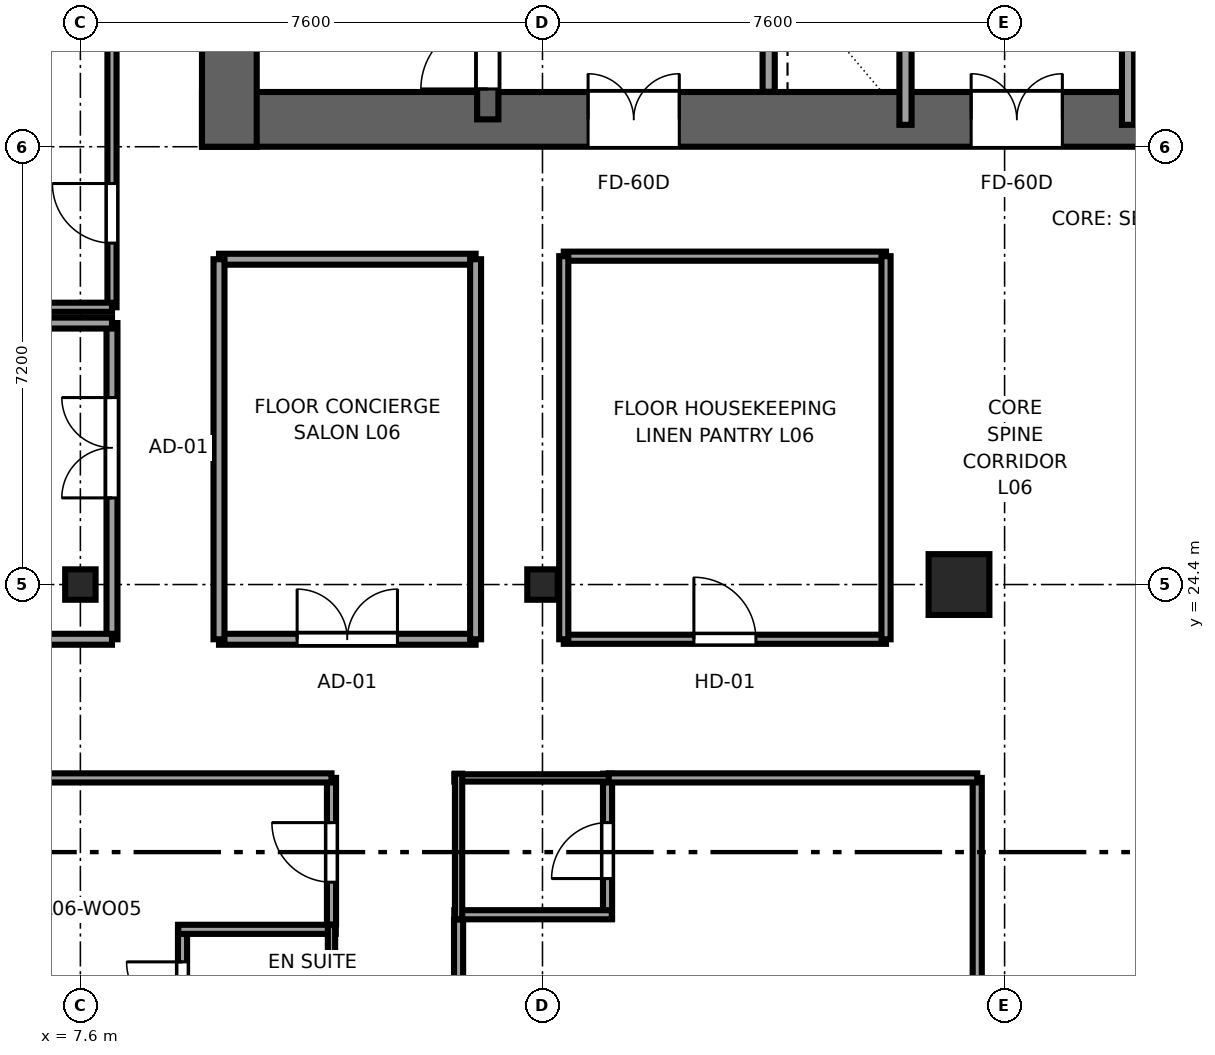
"""IFC4 building model, lengths in metres.
Left out: names, types, materials, properties, quantities, classifications, styles, units other than length and angle.
Written with IfcOpenShell. Run it as: python <this file> out.ifc"""

import sys

from ifc_helpers import new_model, si_unit, direction, frame, frame_2d, origin, origin_2d, place, context, subcontext, project, spatial, rectangle, i_section, extrude, source, transform, mapped, element, fill, save


model = new_model("IFC4")
c1 = context("Model", 3, precision=1e-05, world=origin(), true_north=direction((0.0, 1.0)))
c2 = subcontext(c1, "Body", "Model", "MODEL_VIEW")
j1 = project(units=[si_unit("LENGTHUNIT", "METRE"), si_unit("PLANEANGLEUNIT", "RADIAN")], contexts=[c1])
p1 = place(None, origin())
s1 = spatial("IfcSite", under=j1, at=p1, CompositionType="ELEMENT")
p2 = place(p1, origin())
s2 = spatial("IfcBuilding", under=s1, at=p2, CompositionType="ELEMENT")
p3 = place(p2, frame((0.0, 0.0, 32.0)))
s3 = spatial("IfcBuildingStorey", under=s2, at=p3, CompositionType="ELEMENT", Elevation=32.0)
p4 = place(p3, frame((9.6, 32.05, 0.0), z_axis=(0.0, 0.0, 1.0), x_axis=(1.0, 0.0, 0.0)))
e1 = element("IfcWall", 1, at=p4, inside=s3, PredefinedType="SHEAR", context=c2, shape_type="SweptSolid", body=[
    extrude(rectangle(XDim=26.8, YDim=0.9, at=frame_2d((13.4, 0.0))), origin(), (0.0, 0.0, 1.0), 3.55),
])
p5 = place(p4, frame((7.85, 0.0, 0.0), z_axis=(0.0, 0.0, 1.0), x_axis=(-1.0, 0.0, 0.0)))
e2 = element("IfcOpeningElement", 2, at=p5, cuts=e1, PredefinedType="OPENING", context=c2, shape_type="SweptSolid", body=[
    extrude(rectangle(XDim=1.5, YDim=2.04, at=frame_2d((0.75, 1.02))), frame((0.0, 0.46, 0.0), z_axis=(0.0, -1.0, 0.0), x_axis=(1.0, 0.0, 0.0)), (0.0, 0.0, 1.0), 0.92),
])
p6 = place(p4, frame((14.15, 0.0, 0.0), z_axis=(0.0, 0.0, 1.0), x_axis=(-1.0, 0.0, 0.0)))
e3 = element("IfcOpeningElement", 3, at=p6, cuts=e1, PredefinedType="OPENING", context=c2, shape_type="SweptSolid", body=[
    extrude(rectangle(XDim=1.5, YDim=2.04, at=frame_2d((0.75, 1.02))), frame((0.0, 0.46, 0.0), z_axis=(0.0, -1.0, 0.0), x_axis=(1.0, 0.0, 0.0)), (0.0, 0.0, 1.0), 0.92),
])
p7 = place(p4, frame((20.45, 0.0, 0.0), z_axis=(0.0, 0.0, 1.0), x_axis=(-1.0, 0.0, 0.0)))
e4 = element("IfcOpeningElement", 4, at=p7, cuts=e1, PredefinedType="OPENING", context=c2, shape_type="SweptSolid", body=[
    extrude(rectangle(XDim=1.5, YDim=2.04, at=frame_2d((0.75, 1.02))), frame((0.0, 0.46, 0.0), z_axis=(0.0, -1.0, 0.0), x_axis=(1.0, 0.0, 0.0)), (0.0, 0.0, 1.0), 0.92),
])
p8 = place(p3, frame((10.05, 31.6, 0.0), z_axis=(0.0, 0.0, 1.0), x_axis=(0.0, 1.0, 0.0)))
e5 = element("IfcWall", 5, at=p8, inside=s3, PredefinedType="SHEAR", context=c2, shape_type="SweptSolid", body=[
    extrude(rectangle(XDim=13.6, YDim=0.9, at=frame_2d((6.8, 0.0))), origin(), (0.0, 0.0, 1.0), 3.55),
])
p9 = place(p3, frame((14.3, 32.05, 0.0), z_axis=(0.0, 0.0, 1.0), x_axis=(0.0, 1.0, 0.0)))
e6 = element("IfcWall", 6, at=p9, inside=s3, PredefinedType="SHEAR", context=c2, shape_type="SweptSolid", body=[
    extrude(rectangle(XDim=12.7, YDim=0.35, at=frame_2d((6.35, 0.0))), origin(), (0.0, 0.0, 1.0), 3.55),
])
p10 = place(p9, frame((0.5, 0.0, 0.0)))
e7 = element("IfcOpeningElement", 7, at=p10, cuts=e6, PredefinedType="OPENING", context=c2, shape_type="SweptSolid", body=[
    extrude(rectangle(XDim=1.1, YDim=2.12, at=frame_2d((0.55, 1.06))), frame((0.0, 0.185, 0.0), z_axis=(0.0, -1.0, 0.0), x_axis=(1.0, 0.0, 0.0)), (0.0, 0.0, 1.0), 0.37),
])
m1 = source(origin(), c2, "Body", "SweptSolid", [
    extrude(i_section(OverallWidth=0.5, OverallDepth=0.5, WebThickness=0.028, FlangeThickness=0.045, at=origin_2d()), origin(), (0.0, 0.0, 1.0), 3.55),
])
for number, where, z_axis, x_axis in (
    (8, (7.6, 24.4, 0.0), (0.0, 0.0, 1.0), (1.0, 0.0, 0.0)),
    (9, (15.2, 24.4, 0.0), (0.0, 0.0, 1.0), (1.0, 0.0, 0.0)),
):
    element("IfcColumn", number, at=place(p3, frame(where, z_axis=z_axis, x_axis=x_axis)), inside=s3, PredefinedType="COLUMN", context=c2, shape_type="MappedRepresentation", body=[
        mapped(m1, transform((0.0, 0.0, 0.0), x_axis=(1.0, 0.0, 0.0), y_axis=(0.0, 1.0, 0.0), z_axis=(0.0, 0.0, 1.0), scale=1.0)),
    ])
m2 = source(origin(), c2, "Body", "SweptSolid", [
    extrude(rectangle(XDim=1.0, YDim=1.0, at=origin_2d()), origin(), (0.0, 0.0, 1.0), 3.55),
])
p11 = place(p3, frame((22.05, 24.4, 0.0), z_axis=(0.0, 0.0, 1.0), x_axis=(1.0, 0.0, 0.0)))
e10 = element("IfcColumn", 10, at=p11, inside=s3, PredefinedType="COLUMN", context=c2, shape_type="MappedRepresentation", body=[
    mapped(m2, transform((0.0, 0.0, 0.0), x_axis=(1.0, 0.0, 0.0), y_axis=(0.0, 1.0, 0.0), z_axis=(0.0, 0.0, 1.0), scale=1.0)),
])
p12 = place(p3, frame((18.92, 32.504, 0.0), z_axis=(0.0, 0.0, 1.0), x_axis=(0.0, 1.0, 0.0)))
e11 = element("IfcWall", 11, at=p12, inside=s3, PredefinedType="SOLIDWALL", context=c2, shape_type="SweptSolid", body=[
    extrude(rectangle(XDim=3.646, YDim=0.2, at=frame_2d((1.823, 0.0))), origin(), (0.0, 0.0, 1.0), 3.37),
])
for number, where, z_axis, x_axis in (
    (12, (21.17, 31.96, 0.0), (0.0, 0.0, 1.0), (0.0, 1.0, 0.0)),
    (13, (24.83, 31.96, 0.0), (0.0, 0.0, 1.0), (0.0, 1.0, 0.0)),
):
    element("IfcWall", number, at=place(p3, frame(where, z_axis=z_axis, x_axis=x_axis)), inside=s3, PredefinedType="SOLIDWALL", context=c2, shape_type="SweptSolid", body=[
        extrude(rectangle(XDim=12.58, YDim=0.2, at=frame_2d((6.29, 0.0))), origin(), (0.0, 0.0, 1.0), 3.37),
    ])
p13 = place(p3, frame((9.28, 16.81, 0.0), z_axis=(0.0, 0.0, 1.0), x_axis=(0.0, 1.0, 0.0)))
e14 = element("IfcWall", 14, at=p13, inside=s3, PredefinedType="PARTITIONING", context=c2, shape_type="SweptSolid", body=[
    extrude(rectangle(XDim=1.99, YDim=0.15, at=frame_2d((0.995, 0.0))), origin(), (0.0, 0.0, 1.0), 3.37),
])
p14 = place(p13, frame((0.465, 0.0, 0.0)))
e15 = element("IfcOpeningElement", 15, at=p14, cuts=e14, PredefinedType="OPENING", context=c2, shape_type="SweptSolid", body=[
    extrude(rectangle(XDim=0.92, YDim=2.01, at=frame_2d((0.46, 1.005))), frame((0.0, 0.085, 0.0), z_axis=(0.0, -1.0, 0.0), x_axis=(1.0, 0.0, 0.0)), (0.0, 0.0, 1.0), 0.17),
])
p15 = place(p3, frame((9.21, 18.73, 0.0), z_axis=(0.0, 0.0, 1.0), x_axis=(1.0, 0.0, 0.0)))
e16 = element("IfcWall", 16, at=p15, inside=s3, PredefinedType="PARTITIONING", context=c2, shape_type="SweptSolid", body=[
    extrude(rectangle(XDim=2.59, YDim=0.15, at=frame_2d((1.295, 0.0))), origin(), (0.0, 0.0, 1.0), 3.37),
])
p16 = place(p3, frame((11.73, 16.81, 0.0), z_axis=(0.0, 0.0, 1.0), x_axis=(0.0, 1.0, 0.0)))
e17 = element("IfcWall", 17, at=p16, inside=s3, PredefinedType="PLUMBINGWALL", context=c2, shape_type="SweptSolid", body=[
    extrude(rectangle(XDim=1.99, YDim=0.12, at=frame_2d((0.995, 0.0))), origin(), (0.0, 0.0, 1.0), 3.37),
])
p17 = place(p3, frame((16.27, 18.9, 0.0), z_axis=(0.0, 0.0, 1.0), x_axis=(0.0, 1.0, 0.0)))
e18 = element("IfcWall", 18, at=p17, inside=s3, PredefinedType="PARTITIONING", context=c2, shape_type="SweptSolid", body=[
    extrude(rectangle(XDim=2.39, YDim=0.15, at=frame_2d((1.195, 0.0))), origin(), (0.0, 0.0, 1.0), 3.37),
])
p18 = place(p17, frame((0.665, 0.0, 0.0)))
e19 = element("IfcOpeningElement", 19, at=p18, cuts=e18, PredefinedType="OPENING", context=c2, shape_type="SweptSolid", body=[
    extrude(rectangle(XDim=0.92, YDim=2.01, at=frame_2d((0.46, 1.005))), frame((0.0, 0.085, 0.0), z_axis=(0.0, -1.0, 0.0), x_axis=(1.0, 0.0, 0.0)), (0.0, 0.0, 1.0), 0.17),
])
p19 = place(p3, frame((13.75, 18.97, 0.0), z_axis=(0.0, 0.0, 1.0), x_axis=(1.0, 0.0, 0.0)))
e20 = element("IfcWall", 20, at=p19, inside=s3, PredefinedType="PARTITIONING", context=c2, shape_type="SweptSolid", body=[
    extrude(rectangle(XDim=2.59, YDim=0.15, at=frame_2d((1.295, 0.0))), origin(), (0.0, 0.0, 1.0), 3.37),
])
p20 = place(p3, frame((13.75, 21.22, 0.0), z_axis=(0.0, 0.0, 1.0), x_axis=(1.0, 0.0, 0.0)))
e21 = element("IfcWall", 21, at=p20, inside=s3, PredefinedType="PLUMBINGWALL", context=c2, shape_type="SweptSolid", body=[
    extrude(rectangle(XDim=2.59, YDim=0.12, at=frame_2d((1.295, 0.0))), origin(), (0.0, 0.0, 1.0), 3.37),
])
p21 = place(p3, frame((13.82, 18.9, 0.0), z_axis=(0.0, 0.0, 1.0), x_axis=(0.0, 1.0, 0.0)))
e22 = element("IfcWall", 22, at=p21, inside=s3, PredefinedType="PLUMBINGWALL", context=c2, shape_type="SweptSolid", body=[
    extrude(rectangle(XDim=2.39, YDim=0.12, at=frame_2d((1.195, 0.0))), origin(), (0.0, 0.0, 1.0), 3.37),
])
p22 = place(p3, frame((11.73, 18.81, 0.0), z_axis=(0.0, 0.0, 1.0), x_axis=(0.0, 1.0, 0.0)))
e23 = element("IfcWall", 23, at=p22, inside=s3, PredefinedType="PARTITIONING", context=c2, shape_type="SweptSolid", body=[
    extrude(rectangle(XDim=2.41, YDim=0.15, at=frame_2d((1.205, 0.0))), origin(), (0.0, 0.0, 1.0), 3.37),
])
p23 = place(p22, frame((0.695, 0.0, 0.0)))
e24 = element("IfcOpeningElement", 24, at=p23, cuts=e23, PredefinedType="OPENING", context=c2, shape_type="SweptSolid", body=[
    extrude(rectangle(XDim=0.98, YDim=2.12, at=frame_2d((0.49, 1.06))), frame((0.0, 0.085, 0.0), z_axis=(0.0, -1.0, 0.0), x_axis=(1.0, 0.0, 0.0)), (0.0, 0.0, 1.0), 0.17),
])
p24 = place(p3, frame((0.405, 21.22, 0.0), z_axis=(0.0, 0.0, 1.0), x_axis=(1.0, 0.0, 0.0)))
e25 = element("IfcWall", 25, at=p24, inside=s3, PredefinedType="PARTITIONING", context=c2, shape_type="SweptSolid", body=[
    extrude(rectangle(XDim=11.325, YDim=0.15, at=frame_2d((5.663, 0.0))), origin(), (0.0, 0.0, 1.0), 3.37),
])
p25 = place(p3, frame((13.82, 14.48, 0.0), z_axis=(0.0, 0.0, 1.0), x_axis=(0.0, 1.0, 0.0)))
e26 = element("IfcWall", 26, at=p25, inside=s3, PredefinedType="PARTITIONING", context=c2, shape_type="SweptSolid", body=[
    extrude(rectangle(XDim=4.41, YDim=0.15, at=frame_2d((2.205, 0.0))), origin(), (0.0, 0.0, 1.0), 3.37),
])
p26 = place(p25, frame((1.995, 0.0, 0.0)))
e27 = element("IfcOpeningElement", 27, at=p26, cuts=e26, PredefinedType="OPENING", context=c2, shape_type="SweptSolid", body=[
    extrude(rectangle(XDim=0.98, YDim=2.12, at=frame_2d((0.49, 1.06))), frame((0.0, 0.085, 0.0), z_axis=(0.0, -1.0, 0.0), x_axis=(1.0, 0.0, 0.0)), (0.0, 0.0, 1.0), 0.17),
])
p27 = place(p3, frame((22.35, 14.48, 0.0), z_axis=(0.0, 0.0, 1.0), x_axis=(0.0, 1.0, 0.0)))
e28 = element("IfcWall", 28, at=p27, inside=s3, PredefinedType="PARTITIONING", context=c2, shape_type="SweptSolid", body=[
    extrude(rectangle(XDim=6.74, YDim=0.15, at=frame_2d((3.37, 0.0))), origin(), (0.0, 0.0, 1.0), 3.37),
])
p28 = place(p3, frame((16.29, 21.22, 0.0), z_axis=(0.0, 0.0, 1.0), x_axis=(1.0, 0.0, 0.0)))
e29 = element("IfcWall", 29, at=p28, inside=s3, PredefinedType="PARTITIONING", context=c2, shape_type="SweptSolid", body=[
    extrude(rectangle(XDim=6.06, YDim=0.15, at=frame_2d((3.03, 0.0))), origin(), (0.0, 0.0, 1.0), 3.37),
])
p29 = place(p3, frame((8.12, 23.5, 0.0), z_axis=(0.0, 0.0, 1.0), x_axis=(0.0, 1.0, 0.0)))
e30 = element("IfcWall", 30, at=p29, inside=s3, PredefinedType="PARTITIONING", context=c2, shape_type="SweptSolid", body=[
    extrude(rectangle(XDim=5.2, YDim=0.18, at=frame_2d((2.6, 0.0))), origin(), (0.0, 0.0, 1.0), 3.37),
])
p30 = place(p29, frame((2.325, 0.0, 0.0)))
e31 = element("IfcOpeningElement", 31, at=p30, cuts=e30, PredefinedType="OPENING", context=c2, shape_type="SweptSolid", body=[
    extrude(rectangle(XDim=1.65, YDim=2.15, at=frame_2d((0.825, 1.075))), frame((0.0, 0.1, 0.0), z_axis=(0.0, -1.0, 0.0), x_axis=(1.0, 0.0, 0.0)), (0.0, 0.0, 1.0), 0.2),
])
for number, where, z_axis, x_axis in (
    (32, (0.405, 23.5, 0.0), (0.0, 0.0, 1.0), (1.0, 0.0, 0.0)),
    (33, (0.405, 28.7, 0.0), (0.0, 0.0, 1.0), (1.0, 0.0, 0.0)),
):
    element("IfcWall", number, at=place(p3, frame(where, z_axis=z_axis, x_axis=x_axis)), inside=s3, PredefinedType="PARTITIONING", context=c2, shape_type="SweptSolid", body=[
        extrude(rectangle(XDim=7.715, YDim=0.18, at=frame_2d((3.857, 0.0))), origin(), (0.0, 0.0, 1.0), 3.37),
    ])
p31 = place(p3, frame((8.12, 28.96, 0.0), z_axis=(0.0, 0.0, 1.0), x_axis=(0.0, 1.0, 0.0)))
e34 = element("IfcWall", 34, at=p31, inside=s3, PredefinedType="PARTITIONING", context=c2, shape_type="SweptSolid", body=[
    extrude(rectangle(XDim=16.635, YDim=0.15, at=frame_2d((8.317, 0.0))), origin(), (0.0, 0.0, 1.0), 3.37),
])
p32 = place(p31, frame((1.055, 0.0, 0.0)))
e35 = element("IfcOpeningElement", 35, at=p32, cuts=e34, PredefinedType="OPENING", context=c2, shape_type="SweptSolid", body=[
    extrude(rectangle(XDim=0.98, YDim=2.12, at=frame_2d((0.49, 1.06))), frame((0.0, 0.085, 0.0), z_axis=(0.0, -1.0, 0.0), x_axis=(1.0, 0.0, 0.0)), (0.0, 0.0, 1.0), 0.17),
])
p33 = place(p3, frame((2.77, 28.96, 0.0), z_axis=(0.0, 0.0, 1.0), x_axis=(1.0, 0.0, 0.0)))
e36 = element("IfcWall", 36, at=p33, inside=s3, PredefinedType="PARTITIONING", context=c2, shape_type="SweptSolid", body=[
    extrude(rectangle(XDim=5.35, YDim=0.15, at=frame_2d((2.675, 0.0))), origin(), (0.0, 0.0, 1.0), 3.37),
])
p34 = place(p3, frame((9.88, 23.5, 0.0), z_axis=(0.0, 0.0, 1.0), x_axis=(1.0, 0.0, 0.0)))
e37 = element("IfcWall", 37, at=p34, inside=s3, PredefinedType="PARTITIONING", context=c2, shape_type="SweptSolid", body=[
    extrude(rectangle(XDim=4.22, YDim=0.18, at=frame_2d((2.11, 0.0))), origin(), (0.0, 0.0, 1.0), 3.37),
])
p35 = place(p34, frame((1.285, 0.0, 0.0)))
e38 = element("IfcOpeningElement", 38, at=p35, cuts=e37, PredefinedType="OPENING", context=c2, shape_type="SweptSolid", body=[
    extrude(rectangle(XDim=1.65, YDim=2.15, at=frame_2d((0.825, 1.075))), frame((0.0, 0.1, 0.0), z_axis=(0.0, -1.0, 0.0), x_axis=(1.0, 0.0, 0.0)), (0.0, 0.0, 1.0), 0.2),
])
p36 = place(p3, frame((9.88, 29.75, 0.0), z_axis=(0.0, 0.0, 1.0), x_axis=(1.0, 0.0, 0.0)))
e39 = element("IfcWall", 39, at=p36, inside=s3, PredefinedType="PARTITIONING", context=c2, shape_type="SweptSolid", body=[
    extrude(rectangle(XDim=4.22, YDim=0.18, at=frame_2d((2.11, 0.0))), origin(), (0.0, 0.0, 1.0), 3.37),
])
for number, where, z_axis, x_axis in (
    (40, (9.88, 23.5, 0.0), (0.0, 0.0, 1.0), (0.0, 1.0, 0.0)),
    (41, (14.1, 23.5, 0.0), (0.0, 0.0, 1.0), (0.0, 1.0, 0.0)),
):
    element("IfcWall", number, at=place(p3, frame(where, z_axis=z_axis, x_axis=x_axis)), inside=s3, PredefinedType="PARTITIONING", context=c2, shape_type="SweptSolid", body=[
        extrude(rectangle(XDim=6.25, YDim=0.18, at=frame_2d((3.125, 0.0))), origin(), (0.0, 0.0, 1.0), 3.37),
    ])
p37 = place(p3, frame((15.55, 23.5, 0.0), z_axis=(0.0, 0.0, 1.0), x_axis=(1.0, 0.0, 0.0)))
e42 = element("IfcWall", 42, at=p37, inside=s3, PredefinedType="PARTITIONING", context=c2, shape_type="SweptSolid", body=[
    extrude(rectangle(XDim=5.3, YDim=0.15, at=frame_2d((2.65, 0.0))), origin(), (0.0, 0.0, 1.0), 3.37),
])
p38 = place(p37, frame((2.14, 0.0, 0.0)))
e43 = element("IfcOpeningElement", 43, at=p38, cuts=e42, PredefinedType="OPENING", context=c2, shape_type="SweptSolid", body=[
    extrude(rectangle(XDim=1.02, YDim=2.03, at=frame_2d((0.51, 1.015))), frame((0.0, 0.085, 0.0), z_axis=(0.0, -1.0, 0.0), x_axis=(1.0, 0.0, 0.0)), (0.0, 0.0, 1.0), 0.17),
])
p39 = place(p3, frame((15.55, 29.8, 0.0), z_axis=(0.0, 0.0, 1.0), x_axis=(1.0, 0.0, 0.0)))
e44 = element("IfcWall", 44, at=p39, inside=s3, PredefinedType="PARTITIONING", context=c2, shape_type="SweptSolid", body=[
    extrude(rectangle(XDim=5.3, YDim=0.15, at=frame_2d((2.65, 0.0))), origin(), (0.0, 0.0, 1.0), 3.37),
])
for number, where, z_axis, x_axis in (
    (45, (15.55, 23.5, 0.0), (0.0, 0.0, 1.0), (0.0, 1.0, 0.0)),
    (46, (20.85, 23.5, 0.0), (0.0, 0.0, 1.0), (0.0, 1.0, 0.0)),
):
    element("IfcWall", number, at=place(p3, frame(where, z_axis=z_axis, x_axis=x_axis)), inside=s3, PredefinedType="PARTITIONING", context=c2, shape_type="SweptSolid", body=[
        extrude(rectangle(XDim=6.3, YDim=0.15, at=frame_2d((3.15, 0.0))), origin(), (0.0, 0.0, 1.0), 3.37),
    ])
m3 = source(origin(), c2, "Body", "SweptSolid", [
    extrude(rectangle(XDim=1.1, YDim=2.12, at=frame_2d((0.55, 1.06))), frame((0.0, 0.025, 0.0), z_axis=(0.0, -1.0, 0.0), x_axis=(1.0, 0.0, 0.0)), (0.0, 0.0, 1.0), 0.05),
])
p40 = place(p10, origin())
e47 = element("IfcDoor", 47, at=p40, inside=s3, OperationType="SINGLE_SWING_LEFT", PredefinedType="DOOR", context=c2, shape_type="MappedRepresentation", body=[
    mapped(m3, transform((0.0, 0.0, 0.0), x_axis=(1.0, 0.0, 0.0), y_axis=(0.0, 1.0, 0.0), z_axis=(0.0, 0.0, 1.0), scale=1.0)),
])
fill(e7, e47)
m4 = source(origin(), c2, "Body", "SweptSolid", [
    extrude(rectangle(XDim=1.5, YDim=2.04, at=frame_2d((0.75, 1.02))), frame((0.0, 0.025, 0.0), z_axis=(0.0, -1.0, 0.0), x_axis=(1.0, 0.0, 0.0)), (0.0, 0.0, 1.0), 0.05),
])
p41 = place(p5, origin())
e48 = element("IfcDoor", 48, at=p41, inside=s3, OperationType="DOUBLE_DOOR_SINGLE_SWING", PredefinedType="DOOR", context=c2, shape_type="MappedRepresentation", body=[
    mapped(m4, transform((0.0, 0.0, 0.0), x_axis=(1.0, 0.0, 0.0), y_axis=(0.0, 1.0, 0.0), z_axis=(0.0, 0.0, 1.0), scale=1.0)),
])
fill(e2, e48)
p42 = place(p6, origin())
e49 = element("IfcDoor", 49, at=p42, inside=s3, OperationType="DOUBLE_DOOR_SINGLE_SWING", PredefinedType="DOOR", context=c2, shape_type="MappedRepresentation", body=[
    mapped(m4, transform((0.0, 0.0, 0.0), x_axis=(1.0, 0.0, 0.0), y_axis=(0.0, 1.0, 0.0), z_axis=(0.0, 0.0, 1.0), scale=1.0)),
])
fill(e3, e49)
m5 = source(origin(), c2, "Body", "SweptSolid", [
    extrude(rectangle(XDim=0.92, YDim=2.01, at=frame_2d((0.46, 1.005))), frame((0.0, 0.025, 0.0), z_axis=(0.0, -1.0, 0.0), x_axis=(1.0, 0.0, 0.0)), (0.0, 0.0, 1.0), 0.05),
])
p43 = place(p14, origin())
e50 = element("IfcDoor", 50, at=p43, inside=s3, OperationType="SINGLE_SWING_RIGHT", PredefinedType="DOOR", context=c2, shape_type="MappedRepresentation", body=[
    mapped(m5, transform((0.0, 0.0, 0.0), x_axis=(1.0, 0.0, 0.0), y_axis=(0.0, 1.0, 0.0), z_axis=(0.0, 0.0, 1.0), scale=1.0)),
])
fill(e15, e50)
p44 = place(p18, origin())
e51 = element("IfcDoor", 51, at=p44, inside=s3, OperationType="SINGLE_SWING_LEFT", PredefinedType="DOOR", context=c2, shape_type="MappedRepresentation", body=[
    mapped(m5, transform((0.0, 0.0, 0.0), x_axis=(1.0, 0.0, 0.0), y_axis=(0.0, 1.0, 0.0), z_axis=(0.0, 0.0, 1.0), scale=1.0)),
])
fill(e19, e51)
m6 = source(origin(), c2, "Body", "SweptSolid", [
    extrude(rectangle(XDim=0.98, YDim=2.12, at=frame_2d((0.49, 1.06))), frame((0.0, 0.025, 0.0), z_axis=(0.0, -1.0, 0.0), x_axis=(1.0, 0.0, 0.0)), (0.0, 0.0, 1.0), 0.05),
])
p45 = place(p23, origin())
e52 = element("IfcDoor", 52, at=p45, inside=s3, OperationType="SINGLE_SWING_RIGHT", PredefinedType="DOOR", context=c2, shape_type="MappedRepresentation", body=[
    mapped(m6, transform((0.0, 0.0, 0.0), x_axis=(1.0, 0.0, 0.0), y_axis=(0.0, 1.0, 0.0), z_axis=(0.0, 0.0, 1.0), scale=1.0)),
])
fill(e24, e52)
m7 = source(origin(), c2, "Body", "SweptSolid", [
    extrude(rectangle(XDim=1.65, YDim=2.15, at=frame_2d((0.825, 1.075))), frame((0.0, 0.025, 0.0), z_axis=(0.0, -1.0, 0.0), x_axis=(1.0, 0.0, 0.0)), (0.0, 0.0, 1.0), 0.05),
])
p46 = place(p30, origin())
e53 = element("IfcDoor", 53, at=p46, inside=s3, OperationType="DOUBLE_DOOR_SINGLE_SWING", PredefinedType="DOOR", context=c2, shape_type="MappedRepresentation", body=[
    mapped(m7, transform((0.0, 0.0, 0.0), x_axis=(1.0, 0.0, 0.0), y_axis=(0.0, 1.0, 0.0), z_axis=(0.0, 0.0, 1.0), scale=1.0)),
])
fill(e31, e53)
p47 = place(p32, origin())
e54 = element("IfcDoor", 54, at=p47, inside=s3, OperationType="SINGLE_SWING_RIGHT", PredefinedType="DOOR", context=c2, shape_type="MappedRepresentation", body=[
    mapped(m6, transform((0.0, 0.0, 0.0), x_axis=(1.0, 0.0, 0.0), y_axis=(0.0, 1.0, 0.0), z_axis=(0.0, 0.0, 1.0), scale=1.0)),
])
fill(e35, e54)
p48 = place(p35, origin())
e55 = element("IfcDoor", 55, at=p48, inside=s3, OperationType="DOUBLE_DOOR_SINGLE_SWING", PredefinedType="DOOR", context=c2, shape_type="MappedRepresentation", body=[
    mapped(m7, transform((0.0, 0.0, 0.0), x_axis=(1.0, 0.0, 0.0), y_axis=(0.0, 1.0, 0.0), z_axis=(0.0, 0.0, 1.0), scale=1.0)),
])
fill(e38, e55)
m8 = source(origin(), c2, "Body", "SweptSolid", [
    extrude(rectangle(XDim=1.02, YDim=2.03, at=frame_2d((0.51, 1.015))), frame((0.0, 0.025, 0.0), z_axis=(0.0, -1.0, 0.0), x_axis=(1.0, 0.0, 0.0)), (0.0, 0.0, 1.0), 0.05),
])
p49 = place(p38, origin())
e56 = element("IfcDoor", 56, at=p49, inside=s3, OperationType="SINGLE_SWING_LEFT", PredefinedType="DOOR", context=c2, shape_type="MappedRepresentation", body=[
    mapped(m8, transform((0.0, 0.0, 0.0), x_axis=(1.0, 0.0, 0.0), y_axis=(0.0, 1.0, 0.0), z_axis=(0.0, 0.0, 1.0), scale=1.0)),
])
fill(e43, e56)
save(model, sys.argv[1])
